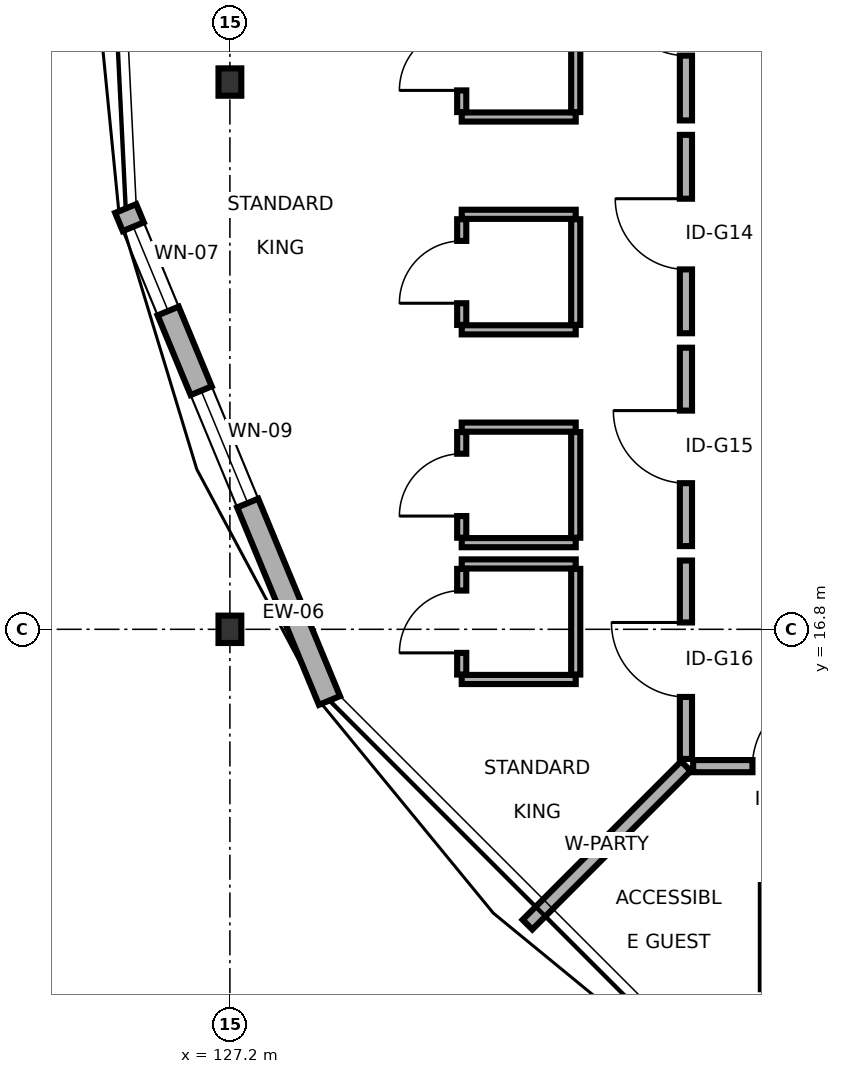
"""IFC4 building model, lengths in metres.
Left out: names, types, materials, properties, quantities, classifications, styles, units other than length and angle.
Written with IfcOpenShell. Run it as: python <this file> out.ifc"""

import sys

from ifc_helpers import new_model, si_unit, direction, frame, frame_2d, origin, origin_2d, place, context, subcontext, project, spatial, rectangle, i_section, extrude, element, fill, save


model = new_model("IFC4")
c1 = context("Model", 3, precision=1e-05, world=origin(), true_north=direction((0.0, 1.0)))
c2 = subcontext(c1, "Body", "Model", "MODEL_VIEW")
j1 = project(units=[si_unit("LENGTHUNIT", "METRE"), si_unit("PLANEANGLEUNIT", "RADIAN")], contexts=[c1])
p1 = place(None, origin())
s1 = spatial("IfcSite", under=j1, at=p1, CompositionType="ELEMENT")
p2 = place(p1, origin())
s2 = spatial("IfcBuilding", under=s1, at=p2, CompositionType="ELEMENT")
p3 = place(p2, frame((0.0, 0.0, 38.5)))
s3 = spatial("IfcBuildingStorey", under=s2, at=p3, CompositionType="ELEMENT", Elevation=38.5)
for number, where, z_axis, x_axis in (
    (1, (127.2, 24.0, 0.0), (0.0, 0.0, 1.0), (1.0, 0.0, 0.0)),
    (2, (127.2, 16.8, 0.0), (0.0, 0.0, 1.0), (1.0, 0.0, 0.0)),
):
    element("IfcColumn", number, at=place(p3, frame(where, z_axis=z_axis, x_axis=x_axis)), inside=s3, PredefinedType="COLUMN", context=c2, shape_type="SweptSolid", body=[
        extrude(i_section(OverallWidth=0.3, OverallDepth=0.36, WebThickness=0.012, FlangeThickness=0.022, FilletRadius=0.027, at=origin_2d()), origin(), (0.0, 0.0, 1.0), 3.4),
    ])
p4 = place(p3, frame((125.829, 22.336, 0.0), z_axis=(0.0, 0.0, 1.0), x_axis=(0.382677014704, -0.923882190767, 0.0)))
e3 = element("IfcWall", 3, at=p4, inside=s3, PredefinedType="SOLIDWALL", context=c2, shape_type="SweptSolid", body=[
    extrude(rectangle(XDim=7.006, YDim=0.3, at=frame_2d((3.503, 0.0))), origin(), (0.0, 0.0, 1.0), 2.695),
])
p5 = place(p4, frame((0.26, 0.0, 0.8)))
e4 = element("IfcOpeningElement", 4, at=p5, cuts=e3, PredefinedType="OPENING", context=c2, shape_type="SweptSolid", body=[
    extrude(rectangle(XDim=1.2, YDim=1.5, at=frame_2d((0.6, 0.75))), frame((0.0, 0.16, 0.0), z_axis=(0.0, -1.0, 0.0), x_axis=(1.0, 0.0, 0.0)), (0.0, 0.0, 1.0), 0.32),
])
p6 = place(p4, frame((2.594, 0.0, 0.8)))
e5 = element("IfcOpeningElement", 5, at=p6, cuts=e3, PredefinedType="OPENING", context=c2, shape_type="SweptSolid", body=[
    extrude(rectangle(XDim=1.6, YDim=1.5, at=frame_2d((0.8, 0.75))), frame((0.0, 0.16, 0.0), z_axis=(0.0, -1.0, 0.0), x_axis=(1.0, 0.0, 0.0)), (0.0, 0.0, 1.0), 0.32),
])
p7 = place(p3, frame((133.295, 15.0, 0.0), z_axis=(0.0, 0.0, 1.0), x_axis=(1.0, 0.0, 0.0)))
e6 = element("IfcWall", 6, at=p7, inside=s3, PredefinedType="PARTITIONING", context=c2, shape_type="SweptSolid", body=[
    extrude(rectangle(XDim=2.516, YDim=0.16, at=frame_2d((1.258, 0.0))), origin(), (0.0, 0.0, 1.0), 3.15),
])
p8 = place(p7, frame((0.78, 0.0, 0.0)))
e7 = element("IfcOpeningElement", 7, at=p8, cuts=e6, PredefinedType="OPENING", context=c2, shape_type="SweptSolid", body=[
    extrude(rectangle(XDim=0.955, YDim=2.17, at=frame_2d((0.478, 1.085))), frame((0.0, 0.09, 0.0), z_axis=(0.0, -1.0, 0.0), x_axis=(1.0, 0.0, 0.0)), (0.0, 0.0, 1.0), 0.18),
])
p9 = place(p3, frame((134.246, 12.065, 0.0), z_axis=(0.0, 0.0, 1.0), x_axis=(0.0, 1.0, 0.0)))
e8 = element("IfcWall", 8, at=p9, inside=s3, PredefinedType="PARTITIONING", context=c2, shape_type="SweptSolid", body=[
    extrude(rectangle(XDim=1.37, YDim=0.12, at=frame_2d((0.685, 0.0))), origin(), (0.0, 0.0, 1.0), 3.15),
])
p10 = place(p3, frame((133.2, 15.0, 0.0), z_axis=(0.0, 0.0, 1.0), x_axis=(-0.707106781187, -0.707106781187, 0.0)))
e9 = element("IfcWall", 9, at=p10, inside=s3, PredefinedType="PARTITIONING", context=c2, shape_type="SweptSolid", body=[
    extrude(rectangle(XDim=2.948, YDim=0.18, at=frame_2d((1.474, 0.0))), origin(), (0.0, 0.0, 1.0), 2.695),
])
p11 = place(p3, frame((133.2, 23.495, 0.0), z_axis=(0.0, 0.0, 1.0), x_axis=(0.0, 1.0, 0.0)))
e10 = element("IfcWall", 10, at=p11, inside=s3, PredefinedType="PARTITIONING", context=c2, shape_type="SweptSolid", body=[
    extrude(rectangle(XDim=2.61, YDim=0.16, at=frame_2d((1.305, 0.0))), origin(), (0.0, 0.0, 1.0), 2.735),
])
p12 = place(p11, frame((0.853, 0.0, 0.0)))
e11 = element("IfcOpeningElement", 11, at=p12, cuts=e10, PredefinedType="OPENING", context=c2, shape_type="SweptSolid", body=[
    extrude(rectangle(XDim=0.905, YDim=2.11, at=frame_2d((0.453, 1.055))), frame((0.0, 0.09, 0.0), z_axis=(0.0, -1.0, 0.0), x_axis=(1.0, 0.0, 0.0)), (0.0, 0.0, 1.0), 0.18),
])
p13 = place(p3, frame((130.25, 23.54, 0.0), z_axis=(0.0, 0.0, 1.0), x_axis=(1.0, 0.0, 0.0)))
e12 = element("IfcWall", 12, at=p13, inside=s3, PredefinedType="PARTITIONING", context=c2, shape_type="SweptSolid", body=[
    extrude(rectangle(XDim=1.5, YDim=0.12, at=frame_2d((0.75, 0.0))), origin(), (0.0, 0.0, 1.0), 3.15),
])
p14 = place(p3, frame((130.25, 23.605, 0.0), z_axis=(0.0, 0.0, 1.0), x_axis=(0.0, 1.0, 0.0)))
e13 = element("IfcWall", 13, at=p14, inside=s3, PredefinedType="PARTITIONING", context=c2, shape_type="SweptSolid", body=[
    extrude(rectangle(XDim=1.39, YDim=0.12, at=frame_2d((0.695, 0.0))), origin(), (0.0, 0.0, 1.0), 2.735),
])
p15 = place(p14, frame((0.285, 0.0, 0.0)))
e14 = element("IfcOpeningElement", 14, at=p15, cuts=e13, PredefinedType="OPENING", context=c2, shape_type="SweptSolid", body=[
    extrude(rectangle(XDim=0.82, YDim=2.08, at=frame_2d((0.41, 1.04))), frame((0.0, 0.07, 0.0), z_axis=(0.0, -1.0, 0.0), x_axis=(1.0, 0.0, 0.0)), (0.0, 0.0, 1.0), 0.14),
])
p16 = place(p3, frame((131.75, 23.605, 0.0), z_axis=(0.0, 0.0, 1.0), x_axis=(0.0, 1.0, 0.0)))
e15 = element("IfcWall", 15, at=p16, inside=s3, PredefinedType="PARTITIONING", context=c2, shape_type="SweptSolid", body=[
    extrude(rectangle(XDim=1.39, YDim=0.12, at=frame_2d((0.695, 0.0))), origin(), (0.0, 0.0, 1.0), 2.735),
])
p17 = place(p3, frame((133.2, 20.695, 0.0), z_axis=(0.0, 0.0, 1.0), x_axis=(0.0, 1.0, 0.0)))
e16 = element("IfcWall", 16, at=p17, inside=s3, PredefinedType="PARTITIONING", context=c2, shape_type="SweptSolid", body=[
    extrude(rectangle(XDim=2.61, YDim=0.16, at=frame_2d((1.305, 0.0))), origin(), (0.0, 0.0, 1.0), 3.15),
])
p18 = place(p17, frame((0.84, 0.0, 0.0)))
e17 = element("IfcOpeningElement", 17, at=p18, cuts=e16, PredefinedType="OPENING", context=c2, shape_type="SweptSolid", body=[
    extrude(rectangle(XDim=0.93, YDim=2.11, at=frame_2d((0.465, 1.055))), frame((0.0, 0.09, 0.0), z_axis=(0.0, -1.0, 0.0), x_axis=(1.0, 0.0, 0.0)), (0.0, 0.0, 1.0), 0.18),
])
for number, where, z_axis, x_axis in (
    (18, (130.25, 20.74, 0.0), (0.0, 0.0, 1.0), (1.0, 0.0, 0.0)),
    (19, (130.25, 22.26, 0.0), (0.0, 0.0, 1.0), (1.0, 0.0, 0.0)),
):
    element("IfcWall", number, at=place(p3, frame(where, z_axis=z_axis, x_axis=x_axis)), inside=s3, PredefinedType="PARTITIONING", context=c2, shape_type="SweptSolid", body=[
        extrude(rectangle(XDim=1.5, YDim=0.12, at=frame_2d((0.75, 0.0))), origin(), (0.0, 0.0, 1.0), 3.15),
    ])
p19 = place(p3, frame((130.25, 20.805, 0.0), z_axis=(0.0, 0.0, 1.0), x_axis=(0.0, 1.0, 0.0)))
e20 = element("IfcWall", 20, at=p19, inside=s3, PredefinedType="PARTITIONING", context=c2, shape_type="SweptSolid", body=[
    extrude(rectangle(XDim=1.39, YDim=0.12, at=frame_2d((0.695, 0.0))), origin(), (0.0, 0.0, 1.0), 3.15),
])
p20 = place(p19, frame((0.285, 0.0, 0.0)))
e21 = element("IfcOpeningElement", 21, at=p20, cuts=e20, PredefinedType="OPENING", context=c2, shape_type="SweptSolid", body=[
    extrude(rectangle(XDim=0.82, YDim=2.08, at=frame_2d((0.41, 1.04))), frame((0.0, 0.07, 0.0), z_axis=(0.0, -1.0, 0.0), x_axis=(1.0, 0.0, 0.0)), (0.0, 0.0, 1.0), 0.14),
])
p21 = place(p3, frame((131.75, 20.805, 0.0), z_axis=(0.0, 0.0, 1.0), x_axis=(0.0, 1.0, 0.0)))
e22 = element("IfcWall", 22, at=p21, inside=s3, PredefinedType="PARTITIONING", context=c2, shape_type="SweptSolid", body=[
    extrude(rectangle(XDim=1.39, YDim=0.12, at=frame_2d((0.695, 0.0))), origin(), (0.0, 0.0, 1.0), 3.15),
])
p22 = place(p3, frame((133.2, 17.895, 0.0), z_axis=(0.0, 0.0, 1.0), x_axis=(0.0, 1.0, 0.0)))
e23 = element("IfcWall", 23, at=p22, inside=s3, PredefinedType="PARTITIONING", context=c2, shape_type="SweptSolid", body=[
    extrude(rectangle(XDim=2.61, YDim=0.16, at=frame_2d((1.305, 0.0))), origin(), (0.0, 0.0, 1.0), 3.15),
])
p23 = place(p22, frame((0.827, 0.0, 0.0)))
e24 = element("IfcOpeningElement", 24, at=p23, cuts=e23, PredefinedType="OPENING", context=c2, shape_type="SweptSolid", body=[
    extrude(rectangle(XDim=0.955, YDim=2.11, at=frame_2d((0.478, 1.055))), frame((0.0, 0.09, 0.0), z_axis=(0.0, -1.0, 0.0), x_axis=(1.0, 0.0, 0.0)), (0.0, 0.0, 1.0), 0.18),
])
for number, where, z_axis, x_axis in (
    (25, (130.25, 17.94, 0.0), (0.0, 0.0, 1.0), (1.0, 0.0, 0.0)),
    (26, (130.25, 19.46, 0.0), (0.0, 0.0, 1.0), (1.0, 0.0, 0.0)),
):
    element("IfcWall", number, at=place(p3, frame(where, z_axis=z_axis, x_axis=x_axis)), inside=s3, PredefinedType="PARTITIONING", context=c2, shape_type="SweptSolid", body=[
        extrude(rectangle(XDim=1.5, YDim=0.12, at=frame_2d((0.75, 0.0))), origin(), (0.0, 0.0, 1.0), 3.15),
    ])
p24 = place(p3, frame((130.25, 18.005, 0.0), z_axis=(0.0, 0.0, 1.0), x_axis=(0.0, 1.0, 0.0)))
e27 = element("IfcWall", 27, at=p24, inside=s3, PredefinedType="PARTITIONING", context=c2, shape_type="SweptSolid", body=[
    extrude(rectangle(XDim=1.39, YDim=0.12, at=frame_2d((0.695, 0.0))), origin(), (0.0, 0.0, 1.0), 3.15),
])
p25 = place(p24, frame((0.285, 0.0, 0.0)))
e28 = element("IfcOpeningElement", 28, at=p25, cuts=e27, PredefinedType="OPENING", context=c2, shape_type="SweptSolid", body=[
    extrude(rectangle(XDim=0.82, YDim=2.08, at=frame_2d((0.41, 1.04))), frame((0.0, 0.07, 0.0), z_axis=(0.0, -1.0, 0.0), x_axis=(1.0, 0.0, 0.0)), (0.0, 0.0, 1.0), 0.14),
])
p26 = place(p3, frame((131.75, 18.005, 0.0), z_axis=(0.0, 0.0, 1.0), x_axis=(0.0, 1.0, 0.0)))
e29 = element("IfcWall", 29, at=p26, inside=s3, PredefinedType="PARTITIONING", context=c2, shape_type="SweptSolid", body=[
    extrude(rectangle(XDim=1.39, YDim=0.12, at=frame_2d((0.695, 0.0))), origin(), (0.0, 0.0, 1.0), 3.15),
])
p27 = place(p3, frame((133.2, 15.095, 0.0), z_axis=(0.0, 0.0, 1.0), x_axis=(0.0, 1.0, 0.0)))
e30 = element("IfcWall", 30, at=p27, inside=s3, PredefinedType="PARTITIONING", context=c2, shape_type="SweptSolid", body=[
    extrude(rectangle(XDim=2.61, YDim=0.16, at=frame_2d((1.305, 0.0))), origin(), (0.0, 0.0, 1.0), 2.735),
])
p28 = place(p27, frame((0.815, 0.0, 0.0)))
e31 = element("IfcOpeningElement", 31, at=p28, cuts=e30, PredefinedType="OPENING", context=c2, shape_type="SweptSolid", body=[
    extrude(rectangle(XDim=0.98, YDim=2.11, at=frame_2d((0.49, 1.055))), frame((0.0, 0.09, 0.0), z_axis=(0.0, -1.0, 0.0), x_axis=(1.0, 0.0, 0.0)), (0.0, 0.0, 1.0), 0.18),
])
for number, where, z_axis, x_axis in (
    (32, (130.25, 16.14, 0.0), (0.0, 0.0, 1.0), (1.0, 0.0, 0.0)),
    (33, (130.25, 17.66, 0.0), (0.0, 0.0, 1.0), (1.0, 0.0, 0.0)),
):
    element("IfcWall", number, at=place(p3, frame(where, z_axis=z_axis, x_axis=x_axis)), inside=s3, PredefinedType="PARTITIONING", context=c2, shape_type="SweptSolid", body=[
        extrude(rectangle(XDim=1.5, YDim=0.12, at=frame_2d((0.75, 0.0))), origin(), (0.0, 0.0, 1.0), 3.15),
    ])
p29 = place(p3, frame((130.25, 16.205, 0.0), z_axis=(0.0, 0.0, 1.0), x_axis=(0.0, 1.0, 0.0)))
e34 = element("IfcWall", 34, at=p29, inside=s3, PredefinedType="PARTITIONING", context=c2, shape_type="SweptSolid", body=[
    extrude(rectangle(XDim=1.39, YDim=0.12, at=frame_2d((0.695, 0.0))), origin(), (0.0, 0.0, 1.0), 2.735),
])
p30 = place(p29, frame((0.285, 0.0, 0.0)))
e35 = element("IfcOpeningElement", 35, at=p30, cuts=e34, PredefinedType="OPENING", context=c2, shape_type="SweptSolid", body=[
    extrude(rectangle(XDim=0.82, YDim=2.08, at=frame_2d((0.41, 1.04))), frame((0.0, 0.07, 0.0), z_axis=(0.0, -1.0, 0.0), x_axis=(1.0, 0.0, 0.0)), (0.0, 0.0, 1.0), 0.14),
])
p31 = place(p3, frame((131.75, 16.205, 0.0), z_axis=(0.0, 0.0, 1.0), x_axis=(0.0, 1.0, 0.0)))
e36 = element("IfcWall", 36, at=p31, inside=s3, PredefinedType="PARTITIONING", context=c2, shape_type="SweptSolid", body=[
    extrude(rectangle(XDim=1.39, YDim=0.12, at=frame_2d((0.695, 0.0))), origin(), (0.0, 0.0, 1.0), 2.735),
])
p32 = place(p5, origin())
e37 = element("IfcWindow", 37, at=p32, inside=s3, PartitioningType="SINGLE_PANEL", PredefinedType="WINDOW", context=c2, shape_type="SweptSolid", body=[
    extrude(rectangle(XDim=1.2, YDim=1.5, at=frame_2d((0.6, 0.75))), frame((0.0, 0.03, 0.0), z_axis=(0.0, -1.0, 0.0), x_axis=(1.0, 0.0, 0.0)), (0.0, 0.0, 1.0), 0.06),
])
fill(e4, e37)
p33 = place(p6, origin())
e38 = element("IfcWindow", 38, at=p33, inside=s3, PartitioningType="SINGLE_PANEL", PredefinedType="WINDOW", context=c2, shape_type="SweptSolid", body=[
    extrude(rectangle(XDim=1.6, YDim=1.5, at=frame_2d((0.8, 0.75))), frame((0.0, 0.03, 0.0), z_axis=(0.0, -1.0, 0.0), x_axis=(1.0, 0.0, 0.0)), (0.0, 0.0, 1.0), 0.06),
])
fill(e5, e38)
p34 = place(p8, origin())
e39 = element("IfcDoor", 39, at=p34, inside=s3, OperationType="SINGLE_SWING_RIGHT", PredefinedType="DOOR", context=c2, shape_type="SweptSolid", body=[
    extrude(rectangle(XDim=0.955, YDim=2.17, at=frame_2d((0.478, 1.085))), frame((0.0, 0.025, 0.0), z_axis=(0.0, -1.0, 0.0), x_axis=(1.0, 0.0, 0.0)), (0.0, 0.0, 1.0), 0.05),
])
fill(e7, e39)
p35 = place(p12, origin())
e40 = element("IfcDoor", 40, at=p35, inside=s3, OperationType="SINGLE_SWING_RIGHT", PredefinedType="DOOR", context=c2, shape_type="SweptSolid", body=[
    extrude(rectangle(XDim=0.905, YDim=2.11, at=frame_2d((0.453, 1.055))), frame((0.0, 0.025, 0.0), z_axis=(0.0, -1.0, 0.0), x_axis=(1.0, 0.0, 0.0)), (0.0, 0.0, 1.0), 0.05),
])
fill(e11, e40)
p36 = place(p15, origin())
e41 = element("IfcDoor", 41, at=p36, inside=s3, OperationType="SINGLE_SWING_LEFT", PredefinedType="DOOR", context=c2, shape_type="SweptSolid", body=[
    extrude(rectangle(XDim=0.82, YDim=2.08, at=frame_2d((0.41, 1.04))), frame((0.0, 0.025, 0.0), z_axis=(0.0, -1.0, 0.0), x_axis=(1.0, 0.0, 0.0)), (0.0, 0.0, 1.0), 0.05),
])
fill(e14, e41)
p37 = place(p18, origin())
e42 = element("IfcDoor", 42, at=p37, inside=s3, OperationType="SINGLE_SWING_RIGHT", PredefinedType="DOOR", context=c2, shape_type="SweptSolid", body=[
    extrude(rectangle(XDim=0.93, YDim=2.11, at=frame_2d((0.465, 1.055))), frame((0.0, 0.025, 0.0), z_axis=(0.0, -1.0, 0.0), x_axis=(1.0, 0.0, 0.0)), (0.0, 0.0, 1.0), 0.05),
])
fill(e17, e42)
p38 = place(p20, origin())
e43 = element("IfcDoor", 43, at=p38, inside=s3, OperationType="SINGLE_SWING_LEFT", PredefinedType="DOOR", context=c2, shape_type="SweptSolid", body=[
    extrude(rectangle(XDim=0.82, YDim=2.08, at=frame_2d((0.41, 1.04))), frame((0.0, 0.025, 0.0), z_axis=(0.0, -1.0, 0.0), x_axis=(1.0, 0.0, 0.0)), (0.0, 0.0, 1.0), 0.05),
])
fill(e21, e43)
p39 = place(p23, origin())
e44 = element("IfcDoor", 44, at=p39, inside=s3, OperationType="SINGLE_SWING_RIGHT", PredefinedType="DOOR", context=c2, shape_type="SweptSolid", body=[
    extrude(rectangle(XDim=0.955, YDim=2.11, at=frame_2d((0.478, 1.055))), frame((0.0, 0.025, 0.0), z_axis=(0.0, -1.0, 0.0), x_axis=(1.0, 0.0, 0.0)), (0.0, 0.0, 1.0), 0.05),
])
fill(e24, e44)
p40 = place(p25, origin())
e45 = element("IfcDoor", 45, at=p40, inside=s3, OperationType="SINGLE_SWING_LEFT", PredefinedType="DOOR", context=c2, shape_type="SweptSolid", body=[
    extrude(rectangle(XDim=0.82, YDim=2.08, at=frame_2d((0.41, 1.04))), frame((0.0, 0.025, 0.0), z_axis=(0.0, -1.0, 0.0), x_axis=(1.0, 0.0, 0.0)), (0.0, 0.0, 1.0), 0.05),
])
fill(e28, e45)
p41 = place(p28, origin())
e46 = element("IfcDoor", 46, at=p41, inside=s3, OperationType="SINGLE_SWING_RIGHT", PredefinedType="DOOR", context=c2, shape_type="SweptSolid", body=[
    extrude(rectangle(XDim=0.98, YDim=2.11, at=frame_2d((0.49, 1.055))), frame((0.0, 0.025, 0.0), z_axis=(0.0, -1.0, 0.0), x_axis=(1.0, 0.0, 0.0)), (0.0, 0.0, 1.0), 0.05),
])
fill(e31, e46)
p42 = place(p30, origin())
e47 = element("IfcDoor", 47, at=p42, inside=s3, OperationType="SINGLE_SWING_LEFT", PredefinedType="DOOR", context=c2, shape_type="SweptSolid", body=[
    extrude(rectangle(XDim=0.82, YDim=2.08, at=frame_2d((0.41, 1.04))), frame((0.0, 0.025, 0.0), z_axis=(0.0, -1.0, 0.0), x_axis=(1.0, 0.0, 0.0)), (0.0, 0.0, 1.0), 0.05),
])
fill(e35, e47)
save(model, sys.argv[1])
